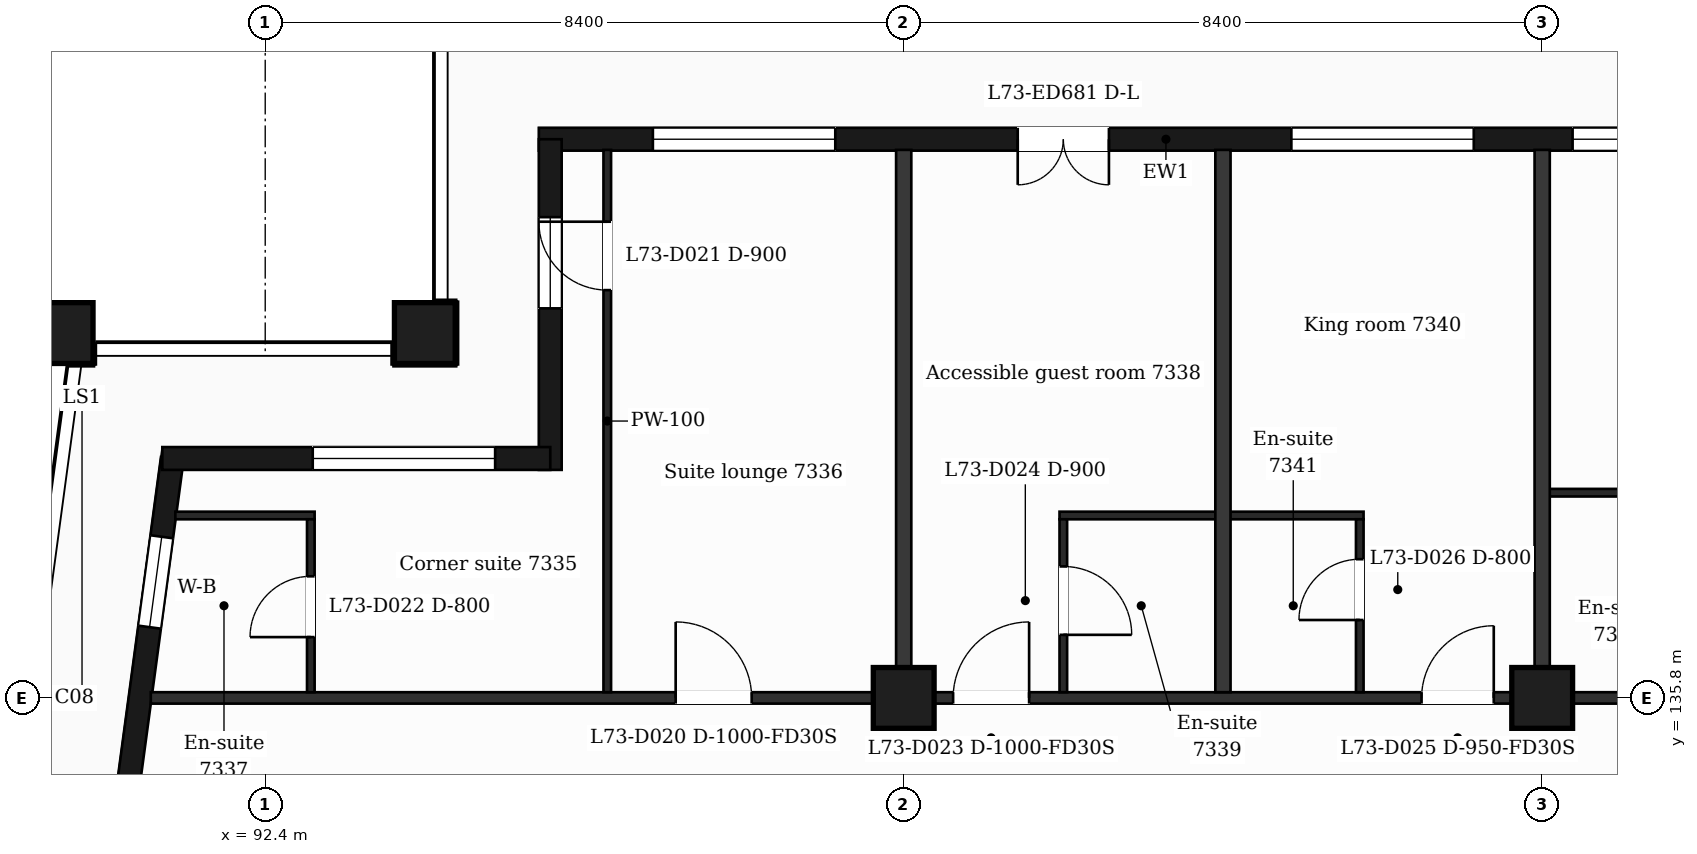
"""IFC4 building model, lengths in metres.
Left out: names, types, materials, properties, quantities, classifications, styles, units other than length and angle.
Written with IfcOpenShell. Run it as: python <this file> out.ifc"""

import sys

from ifc_helpers import new_model, si_unit, direction, frame, frame_2d, origin, origin_2d, place, context, subcontext, project, spatial, rectangle, extrude, element, fill, save


model = new_model("IFC4")
c1 = context("Model", 3, precision=1e-05, world=origin(), true_north=direction((0.0, 1.0)))
c2 = subcontext(c1, "Body", "Model", "MODEL_VIEW")
j1 = project(units=[si_unit("LENGTHUNIT", "METRE"), si_unit("PLANEANGLEUNIT", "RADIAN")], contexts=[c1])
p1 = place(None, origin())
s1 = spatial("IfcSite", under=j1, at=p1, CompositionType="ELEMENT")
p2 = place(p1, origin())
s2 = spatial("IfcBuilding", under=s1, at=p2, CompositionType="ELEMENT")
p3 = place(p2, frame((0.0, 0.0, 299.7)))
s3 = spatial("IfcBuildingStorey", under=s2, at=p3, CompositionType="ELEMENT", Elevation=299.7)
for number, where, z_axis, x_axis in (
    (1, (94.5, 140.6, 0.0), (0.0, 0.0, 1.0), (1.0, 0.0, 0.0)),
    (2, (89.735, 140.6, 0.0), (0.0, 0.0, 1.0), (1.0, 0.0, 0.0)),
    (3, (100.8, 135.8, 0.0), (0.0, 0.0, 1.0), (1.0, 0.0, 0.0)),
    (4, (109.2, 135.8, 0.0), (0.0, 0.0, 1.0), (1.0, 0.0, 0.0)),
):
    element("IfcColumn", number, at=place(p3, frame(where, z_axis=z_axis, x_axis=x_axis)), inside=s3, PredefinedType="COLUMN", context=c2, shape_type="SweptSolid", body=[
        extrude(rectangle(XDim=0.8, YDim=0.8, at=origin_2d()), origin(), (0.0, 0.0, 1.0), 3.7),
    ])
p4 = place(p3, frame((91.177, 138.95, 0.0), z_axis=(0.0, 0.0, 1.0), x_axis=(-0.133426664613, -0.991058689065, 0.0)))
e5 = element("IfcWall", 5, at=p4, inside=s3, PredefinedType="SOLIDWALL", context=c2, shape_type="SweptSolid", body=[
    extrude(rectangle(XDim=6.609, YDim=0.3, at=frame_2d((3.305, 0.0))), origin(), (0.0, 0.0, 1.0), 3.25),
])
p5 = place(p4, frame((1.039, 0.0, 0.9)))
e6 = element("IfcOpeningElement", 6, at=p5, cuts=e5, PredefinedType="OPENING", context=c2, shape_type="SweptSolid", body=[
    extrude(rectangle(XDim=1.2, YDim=2.1, at=frame_2d((0.6, 1.05))), frame((0.0, 0.16, 0.0), z_axis=(0.0, -1.0, 0.0), x_axis=(1.0, 0.0, 0.0)), (0.0, 0.0, 1.0), 0.32),
])
p6 = place(p4, frame((4.294, 0.0, 0.0)))
e7 = element("IfcOpeningElement", 7, at=p6, cuts=e5, PredefinedType="OPENING", context=c2, shape_type="SweptSolid", body=[
    extrude(rectangle(XDim=1.2, YDim=2.4, at=frame_2d((0.6, 1.2))), frame((0.0, 0.16, 0.0), z_axis=(0.0, -1.0, 0.0), x_axis=(1.0, 0.0, 0.0)), (0.0, 0.0, 1.0), 0.32),
])
p7 = place(p3, frame((112.5, 143.15, 0.0), z_axis=(0.0, 0.0, 1.0), x_axis=(-1.0, 0.0, 0.0)))
e8 = element("IfcWall", 8, at=p7, inside=s3, PredefinedType="SOLIDWALL", context=c2, shape_type="SweptSolid", body=[
    extrude(rectangle(XDim=16.5, YDim=0.3, at=frame_2d((8.25, 0.0))), origin(), (0.0, 0.0, 1.0), 3.25),
])
p8 = place(p7, frame((0.5, 0.0, 0.9)))
e9 = element("IfcOpeningElement", 9, at=p8, cuts=e8, PredefinedType="OPENING", context=c2, shape_type="SweptSolid", body=[
    extrude(rectangle(XDim=2.4, YDim=2.1, at=frame_2d((1.2, 1.05))), frame((0.0, 0.16, 0.0), z_axis=(0.0, -1.0, 0.0), x_axis=(1.0, 0.0, 0.0)), (0.0, 0.0, 1.0), 0.32),
])
p9 = place(p7, frame((4.2, 0.0, 0.9)))
e10 = element("IfcOpeningElement", 10, at=p9, cuts=e8, PredefinedType="OPENING", context=c2, shape_type="SweptSolid", body=[
    extrude(rectangle(XDim=2.4, YDim=2.1, at=frame_2d((1.2, 1.05))), frame((0.0, 0.16, 0.0), z_axis=(0.0, -1.0, 0.0), x_axis=(1.0, 0.0, 0.0)), (0.0, 0.0, 1.0), 0.32),
])
p10 = place(p7, frame((9.0, 0.0, 0.0)))
e11 = element("IfcOpeningElement", 11, at=p10, cuts=e8, PredefinedType="OPENING", context=c2, shape_type="SweptSolid", body=[
    extrude(rectangle(XDim=1.2, YDim=2.4, at=frame_2d((0.6, 1.2))), frame((0.0, 0.16, 0.0), z_axis=(0.0, -1.0, 0.0), x_axis=(1.0, 0.0, 0.0)), (0.0, 0.0, 1.0), 0.32),
])
p11 = place(p7, frame((12.6, 0.0, 0.9)))
e12 = element("IfcOpeningElement", 12, at=p11, cuts=e8, PredefinedType="OPENING", context=c2, shape_type="SweptSolid", body=[
    extrude(rectangle(XDim=2.4, YDim=2.1, at=frame_2d((1.2, 1.05))), frame((0.0, 0.16, 0.0), z_axis=(0.0, -1.0, 0.0), x_axis=(1.0, 0.0, 0.0)), (0.0, 0.0, 1.0), 0.32),
])
p12 = place(p3, frame((96.15, 143.15, 0.0), z_axis=(0.0, 0.0, 1.0), x_axis=(0.0, -1.0, 0.0)))
e13 = element("IfcWall", 13, at=p12, inside=s3, PredefinedType="SOLIDWALL", context=c2, shape_type="SweptSolid", body=[
    extrude(rectangle(XDim=4.35, YDim=0.3, at=frame_2d((2.175, 0.0))), origin(), (0.0, 0.0, 1.0), 3.25),
])
p13 = place(p12, frame((1.025, 0.0, 0.9)))
e14 = element("IfcOpeningElement", 14, at=p13, cuts=e13, PredefinedType="OPENING", context=c2, shape_type="SweptSolid", body=[
    extrude(rectangle(XDim=1.2, YDim=2.1, at=frame_2d((0.6, 1.05))), frame((0.0, 0.16, 0.0), z_axis=(0.0, -1.0, 0.0), x_axis=(1.0, 0.0, 0.0)), (0.0, 0.0, 1.0), 0.32),
])
p14 = place(p3, frame((96.15, 138.95, 0.0), z_axis=(0.0, 0.0, 1.0), x_axis=(-1.0, 0.0, 0.0)))
e15 = element("IfcWall", 15, at=p14, inside=s3, PredefinedType="SOLIDWALL", context=c2, shape_type="SweptSolid", body=[
    extrude(rectangle(XDim=5.104, YDim=0.3, at=frame_2d((2.552, 0.0))), origin(), (0.0, 0.0, 1.0), 3.25),
])
p15 = place(p14, frame((0.725, 0.0, 0.9)))
e16 = element("IfcOpeningElement", 16, at=p15, cuts=e15, PredefinedType="OPENING", context=c2, shape_type="SweptSolid", body=[
    extrude(rectangle(XDim=2.4, YDim=2.1, at=frame_2d((1.2, 1.05))), frame((0.0, 0.16, 0.0), z_axis=(0.0, -1.0, 0.0), x_axis=(1.0, 0.0, 0.0)), (0.0, 0.0, 1.0), 0.32),
])
p16 = place(p3, frame((90.895, 135.8, 0.0), z_axis=(0.0, 0.0, 1.0), x_axis=(1.0, 0.0, 0.0)))
e17 = element("IfcWall", 17, at=p16, inside=s3, PredefinedType="PARTITIONING", context=c2, shape_type="SweptSolid", body=[
    extrude(rectangle(XDim=45.011, YDim=0.15, at=frame_2d((22.505, 0.0))), origin(), (0.0, 0.0, 1.0), 3.25),
])
p17 = place(p16, frame((6.906, 0.0, 0.0)))
e18 = element("IfcOpeningElement", 18, at=p17, cuts=e17, PredefinedType="OPENING", context=c2, shape_type="SweptSolid", body=[
    extrude(rectangle(XDim=1.0, YDim=2.1, at=frame_2d((0.5, 1.05))), frame((0.0, 0.085, 0.0), z_axis=(0.0, -1.0, 0.0), x_axis=(1.0, 0.0, 0.0)), (0.0, 0.0, 1.0), 0.17),
])
p18 = place(p16, frame((10.555, 0.0, 0.0)))
e19 = element("IfcOpeningElement", 19, at=p18, cuts=e17, PredefinedType="OPENING", context=c2, shape_type="SweptSolid", body=[
    extrude(rectangle(XDim=1.0, YDim=2.1, at=frame_2d((0.5, 1.05))), frame((0.0, 0.085, 0.0), z_axis=(0.0, -1.0, 0.0), x_axis=(1.0, 0.0, 0.0)), (0.0, 0.0, 1.0), 0.17),
])
p19 = place(p16, frame((16.719, 0.0, 0.0)))
e20 = element("IfcOpeningElement", 20, at=p19, cuts=e17, PredefinedType="OPENING", context=c2, shape_type="SweptSolid", body=[
    extrude(rectangle(XDim=0.95, YDim=2.1, at=frame_2d((0.475, 1.05))), frame((0.0, 0.085, 0.0), z_axis=(0.0, -1.0, 0.0), x_axis=(1.0, 0.0, 0.0)), (0.0, 0.0, 1.0), 0.17),
])
p20 = place(p16, frame((21.281, 0.0, 0.0)))
e21 = element("IfcOpeningElement", 21, at=p20, cuts=e17, PredefinedType="OPENING", context=c2, shape_type="SweptSolid", body=[
    extrude(rectangle(XDim=0.95, YDim=2.1, at=frame_2d((0.475, 1.05))), frame((0.0, 0.085, 0.0), z_axis=(0.0, -1.0, 0.0), x_axis=(1.0, 0.0, 0.0)), (0.0, 0.0, 1.0), 0.17),
])
p21 = place(p16, frame((25.125, 0.0, 0.0)))
e22 = element("IfcOpeningElement", 22, at=p21, cuts=e17, PredefinedType="OPENING", context=c2, shape_type="SweptSolid", body=[
    extrude(rectangle(XDim=0.95, YDim=2.1, at=frame_2d((0.475, 1.05))), frame((0.0, 0.085, 0.0), z_axis=(0.0, -1.0, 0.0), x_axis=(1.0, 0.0, 0.0)), (0.0, 0.0, 1.0), 0.17),
])
p22 = place(p16, frame((27.393, 0.0, 0.0)))
e23 = element("IfcOpeningElement", 23, at=p22, cuts=e17, PredefinedType="OPENING", context=c2, shape_type="SweptSolid", body=[
    extrude(rectangle(XDim=0.95, YDim=2.1, at=frame_2d((0.475, 1.05))), frame((0.0, 0.085, 0.0), z_axis=(0.0, -1.0, 0.0), x_axis=(1.0, 0.0, 0.0)), (0.0, 0.0, 1.0), 0.17),
])
p23 = place(p16, frame((33.518, 0.0, 0.0)))
e24 = element("IfcOpeningElement", 24, at=p23, cuts=e17, PredefinedType="OPENING", context=c2, shape_type="SweptSolid", body=[
    extrude(rectangle(XDim=0.95, YDim=2.1, at=frame_2d((0.475, 1.05))), frame((0.0, 0.085, 0.0), z_axis=(0.0, -1.0, 0.0), x_axis=(1.0, 0.0, 0.0)), (0.0, 0.0, 1.0), 0.17),
])
p24 = place(p16, frame((37.195, 0.0, 0.0)))
e25 = element("IfcOpeningElement", 25, at=p24, cuts=e17, PredefinedType="OPENING", context=c2, shape_type="SweptSolid", body=[
    extrude(rectangle(XDim=1.0, YDim=2.1, at=frame_2d((0.5, 1.05))), frame((0.0, 0.085, 0.0), z_axis=(0.0, -1.0, 0.0), x_axis=(1.0, 0.0, 0.0)), (0.0, 0.0, 1.0), 0.17),
])
p25 = place(p3, frame((91.218, 138.2, 0.0), z_axis=(0.0, 0.0, 1.0), x_axis=(1.0, 0.0, 0.0)))
e26 = element("IfcWall", 26, at=p25, inside=s3, PredefinedType="PARTITIONING", context=c2, shape_type="SweptSolid", body=[
    extrude(rectangle(XDim=1.832, YDim=0.1, at=frame_2d((0.916, 0.0))), origin(), (0.0, 0.0, 1.0), 3.25),
])
p26 = place(p3, frame((102.85, 138.2, 0.0), z_axis=(0.0, 0.0, 1.0), x_axis=(1.0, 0.0, 0.0)))
e27 = element("IfcWall", 27, at=p26, inside=s3, PredefinedType="PARTITIONING", context=c2, shape_type="SweptSolid", body=[
    extrude(rectangle(XDim=4.0, YDim=0.1, at=frame_2d((2.0, 0.0))), origin(), (0.0, 0.0, 1.0), 3.25),
])
p27 = place(p3, frame((109.2, 138.5, 0.0), z_axis=(0.0, 0.0, 1.0), x_axis=(1.0, 0.0, 0.0)))
e28 = element("IfcWall", 28, at=p27, inside=s3, PredefinedType="PARTITIONING", context=c2, shape_type="SweptSolid", body=[
    extrude(rectangle(XDim=2.75, YDim=0.1, at=frame_2d((1.375, 0.0))), origin(), (0.0, 0.0, 1.0), 3.25),
])
p28 = place(p3, frame((93.0, 135.875, 0.0), z_axis=(0.0, 0.0, 1.0), x_axis=(0.0, 1.0, 0.0)))
e29 = element("IfcWall", 29, at=p28, inside=s3, PredefinedType="PARTITIONING", context=c2, shape_type="SweptSolid", body=[
    extrude(rectangle(XDim=2.275, YDim=0.1, at=frame_2d((1.137, 0.0))), origin(), (0.0, 0.0, 1.0), 3.25),
])
p29 = place(p28, frame((0.725, 0.0, 0.0)))
e30 = element("IfcOpeningElement", 30, at=p29, cuts=e29, PredefinedType="OPENING", context=c2, shape_type="SweptSolid", body=[
    extrude(rectangle(XDim=0.8, YDim=2.1, at=frame_2d((0.4, 1.05))), frame((0.0, 0.06, 0.0), z_axis=(0.0, -1.0, 0.0), x_axis=(1.0, 0.0, 0.0)), (0.0, 0.0, 1.0), 0.12),
])
p30 = place(p3, frame((96.9, 135.875, 0.0), z_axis=(0.0, 0.0, 1.0), x_axis=(0.0, 1.0, 0.0)))
e31 = element("IfcWall", 31, at=p30, inside=s3, PredefinedType="PARTITIONING", context=c2, shape_type="SweptSolid", body=[
    extrude(rectangle(XDim=7.135, YDim=0.1, at=frame_2d((3.567, 0.0))), origin(), (0.0, 0.0, 1.0), 3.25),
])
p31 = place(p30, frame((5.29, 0.0, 0.0)))
e32 = element("IfcOpeningElement", 32, at=p31, cuts=e31, PredefinedType="OPENING", context=c2, shape_type="SweptSolid", body=[
    extrude(rectangle(XDim=0.9, YDim=2.1, at=frame_2d((0.45, 1.05))), frame((0.0, 0.06, 0.0), z_axis=(0.0, -1.0, 0.0), x_axis=(1.0, 0.0, 0.0)), (0.0, 0.0, 1.0), 0.12),
])
p32 = place(p3, frame((100.8, 135.875, 0.0), z_axis=(0.0, 0.0, 1.0), x_axis=(0.0, 1.0, 0.0)))
e33 = element("IfcWall", 33, at=p32, inside=s3, PredefinedType="PARTITIONING", context=c2, shape_type="SweptSolid", body=[
    extrude(rectangle(XDim=7.135, YDim=0.2, at=frame_2d((3.567, 0.0))), origin(), (0.0, 0.0, 1.0), 3.25),
])
p33 = place(p3, frame((102.9, 135.875, 0.0), z_axis=(0.0, 0.0, 1.0), x_axis=(0.0, 1.0, 0.0)))
e34 = element("IfcWall", 34, at=p33, inside=s3, PredefinedType="PARTITIONING", context=c2, shape_type="SweptSolid", body=[
    extrude(rectangle(XDim=2.275, YDim=0.1, at=frame_2d((1.137, 0.0))), origin(), (0.0, 0.0, 1.0), 3.25),
])
p34 = place(p33, frame((0.755, 0.0, 0.0)))
e35 = element("IfcOpeningElement", 35, at=p34, cuts=e34, PredefinedType="OPENING", context=c2, shape_type="SweptSolid", body=[
    extrude(rectangle(XDim=0.9, YDim=2.1, at=frame_2d((0.45, 1.05))), frame((0.0, 0.06, 0.0), z_axis=(0.0, -1.0, 0.0), x_axis=(1.0, 0.0, 0.0)), (0.0, 0.0, 1.0), 0.12),
])
p35 = place(p3, frame((105.0, 135.875, 0.0), z_axis=(0.0, 0.0, 1.0), x_axis=(0.0, 1.0, 0.0)))
e36 = element("IfcWall", 36, at=p35, inside=s3, PredefinedType="PARTITIONING", context=c2, shape_type="SweptSolid", body=[
    extrude(rectangle(XDim=7.135, YDim=0.2, at=frame_2d((3.567, 0.0))), origin(), (0.0, 0.0, 1.0), 3.25),
])
p36 = place(p3, frame((106.8, 135.875, 0.0), z_axis=(0.0, 0.0, 1.0), x_axis=(0.0, 1.0, 0.0)))
e37 = element("IfcWall", 37, at=p36, inside=s3, PredefinedType="PARTITIONING", context=c2, shape_type="SweptSolid", body=[
    extrude(rectangle(XDim=2.275, YDim=0.1, at=frame_2d((1.137, 0.0))), origin(), (0.0, 0.0, 1.0), 3.25),
])
p37 = place(p36, frame((0.95, 0.0, 0.0)))
e38 = element("IfcOpeningElement", 38, at=p37, cuts=e37, PredefinedType="OPENING", context=c2, shape_type="SweptSolid", body=[
    extrude(rectangle(XDim=0.8, YDim=2.1, at=frame_2d((0.4, 1.05))), frame((0.0, 0.06, 0.0), z_axis=(0.0, -1.0, 0.0), x_axis=(1.0, 0.0, 0.0)), (0.0, 0.0, 1.0), 0.12),
])
p38 = place(p3, frame((109.2, 135.875, 0.0), z_axis=(0.0, 0.0, 1.0), x_axis=(0.0, 1.0, 0.0)))
e39 = element("IfcWall", 39, at=p38, inside=s3, PredefinedType="PARTITIONING", context=c2, shape_type="SweptSolid", body=[
    extrude(rectangle(XDim=7.135, YDim=0.2, at=frame_2d((3.567, 0.0))), origin(), (0.0, 0.0, 1.0), 3.25),
])
p39 = place(p5, origin())
e40 = element("IfcWindow", 40, at=p39, inside=s3, PartitioningType="SINGLE_PANEL", PredefinedType="WINDOW", context=c2, shape_type="SweptSolid", body=[
    extrude(rectangle(XDim=1.2, YDim=2.1, at=frame_2d((0.6, 1.05))), frame((0.0, 0.03, 0.0), z_axis=(0.0, -1.0, 0.0), x_axis=(1.0, 0.0, 0.0)), (0.0, 0.0, 1.0), 0.06),
])
fill(e6, e40)
p40 = place(p8, origin())
e41 = element("IfcWindow", 41, at=p40, inside=s3, PartitioningType="SINGLE_PANEL", PredefinedType="WINDOW", context=c2, shape_type="SweptSolid", body=[
    extrude(rectangle(XDim=2.4, YDim=2.1, at=frame_2d((1.2, 1.05))), frame((0.0, 0.03, 0.0), z_axis=(0.0, -1.0, 0.0), x_axis=(1.0, 0.0, 0.0)), (0.0, 0.0, 1.0), 0.06),
])
fill(e9, e41)
p41 = place(p9, origin())
e42 = element("IfcWindow", 42, at=p41, inside=s3, PartitioningType="SINGLE_PANEL", PredefinedType="WINDOW", context=c2, shape_type="SweptSolid", body=[
    extrude(rectangle(XDim=2.4, YDim=2.1, at=frame_2d((1.2, 1.05))), frame((0.0, 0.03, 0.0), z_axis=(0.0, -1.0, 0.0), x_axis=(1.0, 0.0, 0.0)), (0.0, 0.0, 1.0), 0.06),
])
fill(e10, e42)
p42 = place(p10, origin())
e43 = element("IfcDoor", 43, at=p42, inside=s3, OperationType="DOUBLE_DOOR_SINGLE_SWING", PredefinedType="DOOR", context=c2, shape_type="SweptSolid", body=[
    extrude(rectangle(XDim=1.2, YDim=2.4, at=frame_2d((0.6, 1.2))), frame((0.0, 0.025, 0.0), z_axis=(0.0, -1.0, 0.0), x_axis=(1.0, 0.0, 0.0)), (0.0, 0.0, 1.0), 0.05),
])
fill(e11, e43)
p43 = place(p11, origin())
e44 = element("IfcWindow", 44, at=p43, inside=s3, PartitioningType="SINGLE_PANEL", PredefinedType="WINDOW", context=c2, shape_type="SweptSolid", body=[
    extrude(rectangle(XDim=2.4, YDim=2.1, at=frame_2d((1.2, 1.05))), frame((0.0, 0.03, 0.0), z_axis=(0.0, -1.0, 0.0), x_axis=(1.0, 0.0, 0.0)), (0.0, 0.0, 1.0), 0.06),
])
fill(e12, e44)
p44 = place(p13, origin())
e45 = element("IfcWindow", 45, at=p44, inside=s3, PartitioningType="SINGLE_PANEL", PredefinedType="WINDOW", context=c2, shape_type="SweptSolid", body=[
    extrude(rectangle(XDim=1.2, YDim=2.1, at=frame_2d((0.6, 1.05))), frame((0.0, 0.03, 0.0), z_axis=(0.0, -1.0, 0.0), x_axis=(1.0, 0.0, 0.0)), (0.0, 0.0, 1.0), 0.06),
])
fill(e14, e45)
p45 = place(p15, origin())
e46 = element("IfcWindow", 46, at=p45, inside=s3, PartitioningType="SINGLE_PANEL", PredefinedType="WINDOW", context=c2, shape_type="SweptSolid", body=[
    extrude(rectangle(XDim=2.4, YDim=2.1, at=frame_2d((1.2, 1.05))), frame((0.0, 0.03, 0.0), z_axis=(0.0, -1.0, 0.0), x_axis=(1.0, 0.0, 0.0)), (0.0, 0.0, 1.0), 0.06),
])
fill(e16, e46)
p46 = place(p17, origin())
e47 = element("IfcDoor", 47, at=p46, inside=s3, OperationType="SINGLE_SWING_LEFT", PredefinedType="DOOR", context=c2, shape_type="SweptSolid", body=[
    extrude(rectangle(XDim=1.0, YDim=2.1, at=frame_2d((0.5, 1.05))), frame((0.0, 0.025, 0.0), z_axis=(0.0, -1.0, 0.0), x_axis=(1.0, 0.0, 0.0)), (0.0, 0.0, 1.0), 0.05),
])
fill(e18, e47)
p47 = place(p31, origin())
e48 = element("IfcDoor", 48, at=p47, inside=s3, OperationType="SINGLE_SWING_RIGHT", PredefinedType="DOOR", context=c2, shape_type="SweptSolid", body=[
    extrude(rectangle(XDim=0.9, YDim=2.1, at=frame_2d((0.45, 1.05))), frame((0.0, 0.025, 0.0), z_axis=(0.0, -1.0, 0.0), x_axis=(1.0, 0.0, 0.0)), (0.0, 0.0, 1.0), 0.05),
])
fill(e32, e48)
p48 = place(p29, origin())
e49 = element("IfcDoor", 49, at=p48, inside=s3, OperationType="SINGLE_SWING_LEFT", PredefinedType="DOOR", context=c2, shape_type="SweptSolid", body=[
    extrude(rectangle(XDim=0.8, YDim=2.1, at=frame_2d((0.4, 1.05))), frame((0.0, 0.025, 0.0), z_axis=(0.0, -1.0, 0.0), x_axis=(1.0, 0.0, 0.0)), (0.0, 0.0, 1.0), 0.05),
])
fill(e30, e49)
p49 = place(p18, origin())
e50 = element("IfcDoor", 50, at=p49, inside=s3, OperationType="SINGLE_SWING_RIGHT", PredefinedType="DOOR", context=c2, shape_type="SweptSolid", body=[
    extrude(rectangle(XDim=1.0, YDim=2.1, at=frame_2d((0.5, 1.05))), frame((0.0, 0.025, 0.0), z_axis=(0.0, -1.0, 0.0), x_axis=(1.0, 0.0, 0.0)), (0.0, 0.0, 1.0), 0.05),
])
fill(e19, e50)
p50 = place(p34, origin())
e51 = element("IfcDoor", 51, at=p50, inside=s3, OperationType="SINGLE_SWING_LEFT", PredefinedType="DOOR", context=c2, shape_type="SweptSolid", body=[
    extrude(rectangle(XDim=0.9, YDim=2.1, at=frame_2d((0.45, 1.05))), frame((0.0, 0.025, 0.0), z_axis=(0.0, -1.0, 0.0), x_axis=(1.0, 0.0, 0.0)), (0.0, 0.0, 1.0), 0.05),
])
fill(e35, e51)
p51 = place(p19, origin())
e52 = element("IfcDoor", 52, at=p51, inside=s3, OperationType="SINGLE_SWING_RIGHT", PredefinedType="DOOR", context=c2, shape_type="SweptSolid", body=[
    extrude(rectangle(XDim=0.95, YDim=2.1, at=frame_2d((0.475, 1.05))), frame((0.0, 0.025, 0.0), z_axis=(0.0, -1.0, 0.0), x_axis=(1.0, 0.0, 0.0)), (0.0, 0.0, 1.0), 0.05),
])
fill(e20, e52)
p52 = place(p37, origin())
e53 = element("IfcDoor", 53, at=p52, inside=s3, OperationType="SINGLE_SWING_LEFT", PredefinedType="DOOR", context=c2, shape_type="SweptSolid", body=[
    extrude(rectangle(XDim=0.8, YDim=2.1, at=frame_2d((0.4, 1.05))), frame((0.0, 0.025, 0.0), z_axis=(0.0, -1.0, 0.0), x_axis=(1.0, 0.0, 0.0)), (0.0, 0.0, 1.0), 0.05),
])
fill(e38, e53)
save(model, sys.argv[1])
